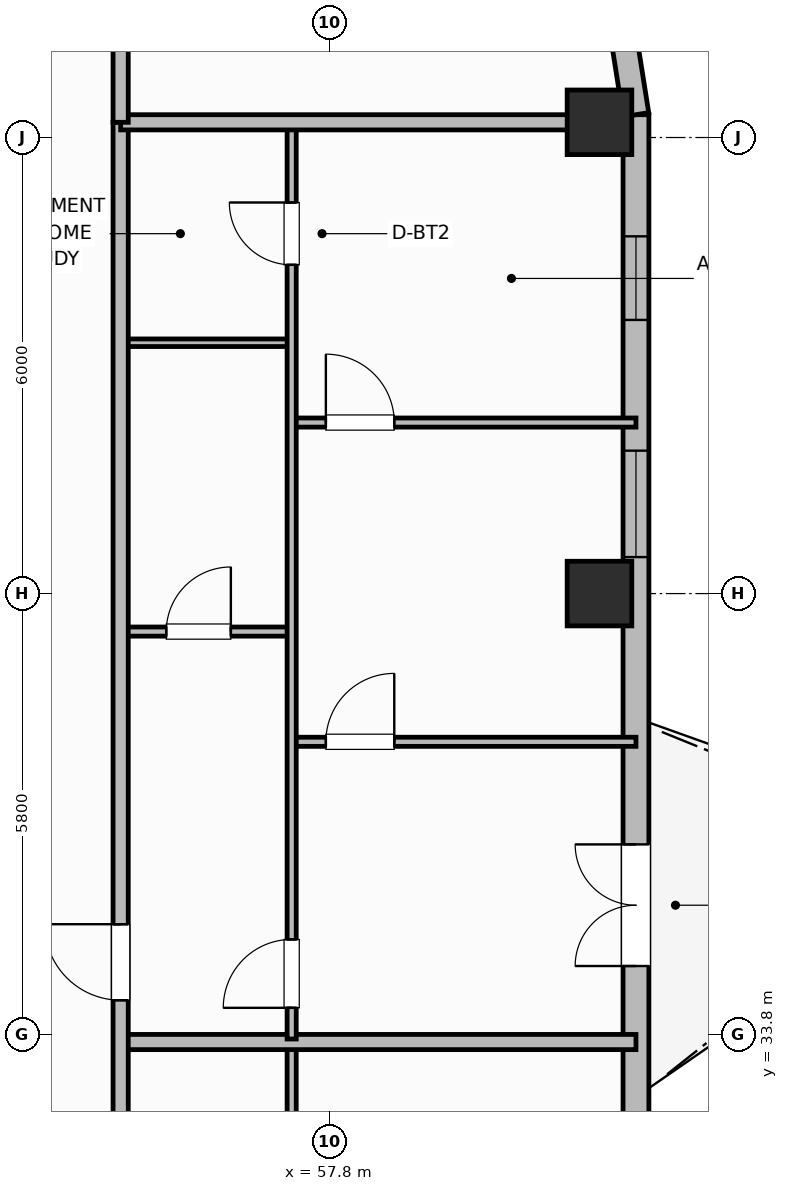
"""IFC4 building model, lengths in metres.
Left out: names, types, materials, properties, quantities, classifications, styles, units other than length and angle.
Written with IfcOpenShell. Run it as: python <this file> out.ifc"""

import sys

from ifc_helpers import new_model, si_unit, direction, frame, frame_2d, origin, origin_2d, place, context, subcontext, project, spatial, rectangle, extrude, element, fill, save


model = new_model("IFC4")
c1 = context("Model", 3, precision=1e-05, world=origin(), true_north=direction((0.0, 1.0)))
c2 = subcontext(c1, "Body", "Model", "MODEL_VIEW")
j1 = project(units=[si_unit("LENGTHUNIT", "METRE"), si_unit("PLANEANGLEUNIT", "RADIAN")], contexts=[c1])
p1 = place(None, origin())
s1 = spatial("IfcSite", under=j1, at=p1, CompositionType="ELEMENT")
p2 = place(p1, origin())
s2 = spatial("IfcBuilding", under=s1, at=p2, CompositionType="ELEMENT")
p3 = place(p2, frame((0.0, 0.0, 207.3)))
s3 = spatial("IfcBuildingStorey", under=s2, at=p3, CompositionType="ELEMENT", Elevation=207.3)
for number, where, z_axis, x_axis in (
    (1, (61.35, 39.6, 0.0), (0.0, 0.0, 1.0), (1.0, 0.0, 0.0)),
    (2, (61.35, 45.8, 0.0), (0.0, 0.0, 1.0), (1.0, 0.0, 0.0)),
):
    element("IfcColumn", number, at=place(p3, frame(where, z_axis=z_axis, x_axis=x_axis)), inside=s3, PredefinedType="COLUMN", context=c2, shape_type="SweptSolid", body=[
        extrude(rectangle(XDim=0.85, YDim=0.85, at=origin_2d()), origin(), (0.0, 0.0, 1.0), 3.7),
    ])
p4 = place(p3, frame((61.83, 32.6, 0.0), z_axis=(0.0, 0.0, 1.0), x_axis=(0.0, 1.0, 0.0)))
e3 = element("IfcWall", 3, at=p4, inside=s3, PredefinedType="SOLIDWALL", context=c2, shape_type="SweptSolid", body=[
    extrude(rectangle(XDim=13.3, YDim=0.34, at=frame_2d((6.65, 0.0))), origin(), (0.0, 0.0, 1.0), 2.72),
])
p5 = place(p4, frame((2.1, 0.0, 0.0)))
e4 = element("IfcOpeningElement", 4, at=p5, cuts=e3, PredefinedType="OPENING", context=c2, shape_type="SweptSolid", body=[
    extrude(rectangle(XDim=1.6, YDim=2.1, at=frame_2d((0.8, 1.05))), frame((0.0, 0.18, 0.0), z_axis=(0.0, -1.0, 0.0), x_axis=(1.0, 0.0, 0.0)), (0.0, 0.0, 1.0), 0.36),
])
p6 = place(p4, frame((7.48, 0.0, 0.71)))
e5 = element("IfcOpeningElement", 5, at=p6, cuts=e3, PredefinedType="OPENING", context=c2, shape_type="SweptSolid", body=[
    extrude(rectangle(XDim=1.4, YDim=1.85, at=frame_2d((0.7, 0.925))), frame((0.0, 0.18, 0.0), z_axis=(0.0, -1.0, 0.0), x_axis=(1.0, 0.0, 0.0)), (0.0, 0.0, 1.0), 0.36),
])
p7 = place(p4, frame((10.6, 0.0, 0.95)))
e6 = element("IfcOpeningElement", 6, at=p7, cuts=e3, PredefinedType="OPENING", context=c2, shape_type="SweptSolid", body=[
    extrude(rectangle(XDim=1.1, YDim=1.65, at=frame_2d((0.55, 0.825))), frame((0.0, 0.18, 0.0), z_axis=(0.0, -1.0, 0.0), x_axis=(1.0, 0.0, 0.0)), (0.0, 0.0, 1.0), 0.36),
])
p8 = place(p3, frame((61.83, 45.9, 0.0), z_axis=(0.0, 0.0, 1.0), x_axis=(-0.156481329164, 0.987680916907, 0.0)))
e7 = element("IfcWall", 7, at=p8, inside=s3, PredefinedType="SOLIDWALL", context=c2, shape_type="SweptSolid", body=[
    extrude(rectangle(XDim=1.136, YDim=0.34, at=frame_2d((0.568, 0.0))), origin(), (0.0, 0.0, 1.0), 2.72),
])
p9 = place(p3, frame((57.3, 22.256, 0.0), z_axis=(0.0, 0.0, 1.0), x_axis=(0.0, 1.0, 0.0)))
e8 = element("IfcWall", 8, at=p9, inside=s3, PredefinedType="PARTITIONING", context=c2, shape_type="SweptSolid", body=[
    extrude(rectangle(XDim=11.404, YDim=0.12, at=frame_2d((5.702, 0.0))), origin(), (0.0, 0.0, 1.0), 2.55),
])
p10 = place(p9, frame((0.41, 0.0, 0.0)))
e9 = element("IfcOpeningElement", 9, at=p10, cuts=e8, PredefinedType="OPENING", context=c2, shape_type="SweptSolid", body=[
    extrude(rectangle(XDim=0.9, YDim=2.1, at=frame_2d((0.45, 1.05))), frame((0.0, 0.07, 0.0), z_axis=(0.0, -1.0, 0.0), x_axis=(1.0, 0.0, 0.0)), (0.0, 0.0, 1.0), 0.14),
])
p11 = place(p3, frame((55.05, 33.7, 0.0), z_axis=(0.0, 0.0, 1.0), x_axis=(1.0, 0.0, 0.0)))
e10 = element("IfcWall", 10, at=p11, inside=s3, PredefinedType="PARTITIONING", context=c2, shape_type="SweptSolid", body=[
    extrude(rectangle(XDim=6.78, YDim=0.2, at=frame_2d((3.39, 0.0))), origin(), (0.0, 0.0, 1.0), 2.55),
])
p12 = place(p3, frame((55.05, 39.1, 0.0), z_axis=(0.0, 0.0, 1.0), x_axis=(1.0, 0.0, 0.0)))
e11 = element("IfcWall", 11, at=p12, inside=s3, PredefinedType="PARTITIONING", context=c2, shape_type="SweptSolid", body=[
    extrude(rectangle(XDim=2.25, YDim=0.12, at=frame_2d((1.125, 0.0))), origin(), (0.0, 0.0, 1.0), 2.55),
])
p13 = place(p12, frame((0.6, 0.0, 0.0)))
e12 = element("IfcOpeningElement", 12, at=p13, cuts=e11, PredefinedType="OPENING", context=c2, shape_type="SweptSolid", body=[
    extrude(rectangle(XDim=0.85, YDim=2.1, at=frame_2d((0.425, 1.05))), frame((0.0, 0.07, 0.0), z_axis=(0.0, -1.0, 0.0), x_axis=(1.0, 0.0, 0.0)), (0.0, 0.0, 1.0), 0.14),
])
p14 = place(p3, frame((55.05, 42.9, 0.0), z_axis=(0.0, 0.0, 1.0), x_axis=(1.0, 0.0, 0.0)))
e13 = element("IfcWall", 13, at=p14, inside=s3, PredefinedType="PARTITIONING", context=c2, shape_type="SweptSolid", body=[
    extrude(rectangle(XDim=2.25, YDim=0.1, at=frame_2d((1.125, 0.0))), origin(), (0.0, 0.0, 1.0), 2.55),
])
p15 = place(p3, frame((57.3, 37.65, 0.0), z_axis=(0.0, 0.0, 1.0), x_axis=(1.0, 0.0, 0.0)))
e14 = element("IfcWall", 14, at=p15, inside=s3, PredefinedType="PARTITIONING", context=c2, shape_type="SweptSolid", body=[
    extrude(rectangle(XDim=4.53, YDim=0.12, at=frame_2d((2.265, 0.0))), origin(), (0.0, 0.0, 1.0), 2.55),
])
p16 = place(p15, frame((0.45, 0.0, 0.0)))
e15 = element("IfcOpeningElement", 15, at=p16, cuts=e14, PredefinedType="OPENING", context=c2, shape_type="SweptSolid", body=[
    extrude(rectangle(XDim=0.9, YDim=2.1, at=frame_2d((0.45, 1.05))), frame((0.0, 0.07, 0.0), z_axis=(0.0, -1.0, 0.0), x_axis=(1.0, 0.0, 0.0)), (0.0, 0.0, 1.0), 0.14),
])
p17 = place(p3, frame((57.3, 41.85, 0.0), z_axis=(0.0, 0.0, 1.0), x_axis=(1.0, 0.0, 0.0)))
e16 = element("IfcWall", 16, at=p17, inside=s3, PredefinedType="PARTITIONING", context=c2, shape_type="SweptSolid", body=[
    extrude(rectangle(XDim=4.53, YDim=0.12, at=frame_2d((2.265, 0.0))), origin(), (0.0, 0.0, 1.0), 2.55),
])
p18 = place(p17, frame((0.45, 0.0, 0.0)))
e17 = element("IfcOpeningElement", 17, at=p18, cuts=e16, PredefinedType="OPENING", context=c2, shape_type="SweptSolid", body=[
    extrude(rectangle(XDim=0.9, YDim=2.1, at=frame_2d((0.45, 1.05))), frame((0.0, 0.07, 0.0), z_axis=(0.0, -1.0, 0.0), x_axis=(1.0, 0.0, 0.0)), (0.0, 0.0, 1.0), 0.14),
])
p19 = place(p3, frame((57.3, 33.74, 0.0), z_axis=(0.0, 0.0, 1.0), x_axis=(0.0, 1.0, 0.0)))
e18 = element("IfcWall", 18, at=p19, inside=s3, PredefinedType="PARTITIONING", context=c2, shape_type="SweptSolid", body=[
    extrude(rectangle(XDim=12.02, YDim=0.12, at=frame_2d((6.01, 0.0))), origin(), (0.0, 0.0, 1.0), 2.55),
])
p20 = place(p19, frame((0.41, 0.0, 0.0)))
e19 = element("IfcOpeningElement", 19, at=p20, cuts=e18, PredefinedType="OPENING", context=c2, shape_type="SweptSolid", body=[
    extrude(rectangle(XDim=0.9, YDim=2.1, at=frame_2d((0.45, 1.05))), frame((0.0, 0.07, 0.0), z_axis=(0.0, -1.0, 0.0), x_axis=(1.0, 0.0, 0.0)), (0.0, 0.0, 1.0), 0.14),
])
p21 = place(p19, frame((10.185, 0.0, 0.0)))
e20 = element("IfcOpeningElement", 20, at=p21, cuts=e18, PredefinedType="OPENING", context=c2, shape_type="SweptSolid", body=[
    extrude(rectangle(XDim=0.82, YDim=2.08, at=frame_2d((0.41, 1.04))), frame((0.0, 0.07, 0.0), z_axis=(0.0, -1.0, 0.0), x_axis=(1.0, 0.0, 0.0)), (0.0, 0.0, 1.0), 0.14),
])
p22 = place(p3, frame((55.05, 10.6, 0.0), z_axis=(0.0, 0.0, 1.0), x_axis=(0.0, 1.0, 0.0)))
e21 = element("IfcWall", 21, at=p22, inside=s3, PredefinedType="PARTITIONING", context=c2, shape_type="SweptSolid", body=[
    extrude(rectangle(XDim=35.2, YDim=0.2, at=frame_2d((17.6, 0.0))), origin(), (0.0, 0.0, 1.0), 2.55),
])
p23 = place(p22, frame((2.65, 0.0, 0.0)))
e22 = element("IfcOpeningElement", 22, at=p23, cuts=e21, PredefinedType="OPENING", context=c2, shape_type="SweptSolid", body=[
    extrude(rectangle(XDim=1.0, YDim=2.15, at=frame_2d((0.5, 1.075))), frame((0.0, 0.11, 0.0), z_axis=(0.0, -1.0, 0.0), x_axis=(1.0, 0.0, 0.0)), (0.0, 0.0, 1.0), 0.22),
])
p24 = place(p22, frame((12.166, 0.0, 0.0)))
e23 = element("IfcOpeningElement", 23, at=p24, cuts=e21, PredefinedType="OPENING", context=c2, shape_type="SweptSolid", body=[
    extrude(rectangle(XDim=1.0, YDim=2.15, at=frame_2d((0.5, 1.075))), frame((0.0, 0.11, 0.0), z_axis=(0.0, -1.0, 0.0), x_axis=(1.0, 0.0, 0.0)), (0.0, 0.0, 1.0), 0.22),
])
p25 = place(p22, frame((23.65, 0.0, 0.0)))
e24 = element("IfcOpeningElement", 24, at=p25, cuts=e21, PredefinedType="OPENING", context=c2, shape_type="SweptSolid", body=[
    extrude(rectangle(XDim=1.0, YDim=2.15, at=frame_2d((0.5, 1.075))), frame((0.0, 0.11, 0.0), z_axis=(0.0, -1.0, 0.0), x_axis=(1.0, 0.0, 0.0)), (0.0, 0.0, 1.0), 0.22),
])
p26 = place(p3, frame((55.05, 45.8, 0.0), z_axis=(0.0, 0.0, 1.0), x_axis=(1.0, 0.0, 0.0)))
e25 = element("IfcWall", 25, at=p26, inside=s3, PredefinedType="PARTITIONING", context=c2, shape_type="SweptSolid", body=[
    extrude(rectangle(XDim=6.36, YDim=0.2, at=frame_2d((3.18, 0.0))), origin(), (0.0, 0.0, 1.0), 2.55),
])
p27 = place(p3, frame((55.05, 45.8, 0.0), z_axis=(0.0, 0.0, 1.0), x_axis=(0.0, 1.0, 0.0)))
e26 = element("IfcWall", 26, at=p27, inside=s3, PredefinedType="PARTITIONING", context=c2, shape_type="SweptSolid", body=[
    extrude(rectangle(XDim=3.73, YDim=0.2, at=frame_2d((1.865, 0.0))), origin(), (0.0, 0.0, 1.0), 2.55),
])
p28 = place(p5, origin())
e27 = element("IfcDoor", 27, at=p28, inside=s3, OperationType="DOUBLE_DOOR_SINGLE_SWING", PredefinedType="DOOR", context=c2, shape_type="SweptSolid", body=[
    extrude(rectangle(XDim=1.6, YDim=2.1, at=frame_2d((0.8, 1.05))), frame((0.0, 0.025, 0.0), z_axis=(0.0, -1.0, 0.0), x_axis=(1.0, 0.0, 0.0)), (0.0, 0.0, 1.0), 0.05),
])
fill(e4, e27)
p29 = place(p6, origin())
e28 = element("IfcWindow", 28, at=p29, inside=s3, PartitioningType="SINGLE_PANEL", PredefinedType="WINDOW", context=c2, shape_type="SweptSolid", body=[
    extrude(rectangle(XDim=1.4, YDim=1.85, at=frame_2d((0.7, 0.925))), frame((0.0, 0.03, 0.0), z_axis=(0.0, -1.0, 0.0), x_axis=(1.0, 0.0, 0.0)), (0.0, 0.0, 1.0), 0.06),
])
fill(e5, e28)
p30 = place(p7, origin())
e29 = element("IfcWindow", 29, at=p30, inside=s3, PartitioningType="SINGLE_PANEL", PredefinedType="WINDOW", context=c2, shape_type="SweptSolid", body=[
    extrude(rectangle(XDim=1.1, YDim=1.65, at=frame_2d((0.55, 0.825))), frame((0.0, 0.03, 0.0), z_axis=(0.0, -1.0, 0.0), x_axis=(1.0, 0.0, 0.0)), (0.0, 0.0, 1.0), 0.06),
])
fill(e6, e29)
p31 = place(p13, origin())
e30 = element("IfcDoor", 30, at=p31, inside=s3, OperationType="SINGLE_SWING_RIGHT", PredefinedType="DOOR", context=c2, shape_type="SweptSolid", body=[
    extrude(rectangle(XDim=0.85, YDim=2.1, at=frame_2d((0.425, 1.05))), frame((0.0, 0.025, 0.0), z_axis=(0.0, -1.0, 0.0), x_axis=(1.0, 0.0, 0.0)), (0.0, 0.0, 1.0), 0.05),
])
fill(e12, e30)
p32 = place(p16, origin())
e31 = element("IfcDoor", 31, at=p32, inside=s3, OperationType="SINGLE_SWING_RIGHT", PredefinedType="DOOR", context=c2, shape_type="SweptSolid", body=[
    extrude(rectangle(XDim=0.9, YDim=2.1, at=frame_2d((0.45, 1.05))), frame((0.0, 0.025, 0.0), z_axis=(0.0, -1.0, 0.0), x_axis=(1.0, 0.0, 0.0)), (0.0, 0.0, 1.0), 0.05),
])
fill(e15, e31)
p33 = place(p18, origin())
e32 = element("IfcDoor", 32, at=p33, inside=s3, OperationType="SINGLE_SWING_LEFT", PredefinedType="DOOR", context=c2, shape_type="SweptSolid", body=[
    extrude(rectangle(XDim=0.9, YDim=2.1, at=frame_2d((0.45, 1.05))), frame((0.0, 0.025, 0.0), z_axis=(0.0, -1.0, 0.0), x_axis=(1.0, 0.0, 0.0)), (0.0, 0.0, 1.0), 0.05),
])
fill(e17, e32)
p34 = place(p20, origin())
e33 = element("IfcDoor", 33, at=p34, inside=s3, OperationType="SINGLE_SWING_LEFT", PredefinedType="DOOR", context=c2, shape_type="SweptSolid", body=[
    extrude(rectangle(XDim=0.9, YDim=2.1, at=frame_2d((0.45, 1.05))), frame((0.0, 0.025, 0.0), z_axis=(0.0, -1.0, 0.0), x_axis=(1.0, 0.0, 0.0)), (0.0, 0.0, 1.0), 0.05),
])
fill(e19, e33)
p35 = place(p21, origin())
e34 = element("IfcDoor", 34, at=p35, inside=s3, OperationType="SINGLE_SWING_RIGHT", PredefinedType="DOOR", context=c2, shape_type="SweptSolid", body=[
    extrude(rectangle(XDim=0.82, YDim=2.08, at=frame_2d((0.41, 1.04))), frame((0.0, 0.025, 0.0), z_axis=(0.0, -1.0, 0.0), x_axis=(1.0, 0.0, 0.0)), (0.0, 0.0, 1.0), 0.05),
])
fill(e20, e34)
p36 = place(p25, origin())
e35 = element("IfcDoor", 35, at=p36, inside=s3, OperationType="SINGLE_SWING_RIGHT", PredefinedType="DOOR", context=c2, shape_type="SweptSolid", body=[
    extrude(rectangle(XDim=1.0, YDim=2.15, at=frame_2d((0.5, 1.075))), frame((0.0, 0.025, 0.0), z_axis=(0.0, -1.0, 0.0), x_axis=(1.0, 0.0, 0.0)), (0.0, 0.0, 1.0), 0.05),
])
fill(e24, e35)
save(model, sys.argv[1])
